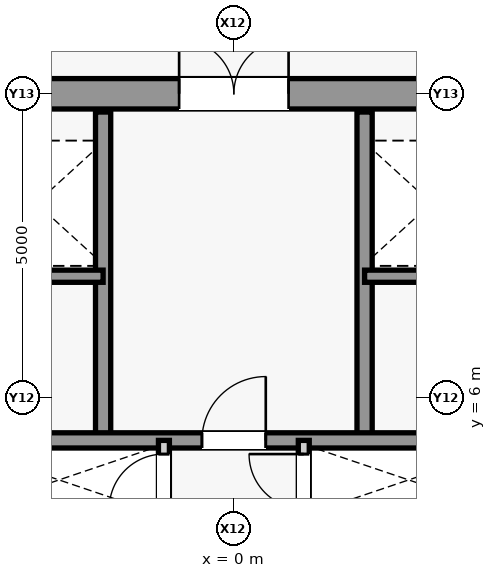
"""IFC4 building model, lengths in metres.
Left out: names, types, materials, properties, quantities, classifications, styles, units other than length and angle.
Written with IfcOpenShell. Run it as: python <this file> out.ifc"""

import sys

from ifc_helpers import new_model, si_unit, direction, frame, frame_2d, origin, place, context, subcontext, project, spatial, rectangle, extrude, source, transform, mapped, element, fill, save


model = new_model("IFC4")
c1 = context("Model", 3, precision=1e-05, world=origin(), true_north=direction((0.0, 1.0)))
c2 = subcontext(c1, "Body", "Model", "MODEL_VIEW")
j1 = project(units=[si_unit("LENGTHUNIT", "METRE"), si_unit("PLANEANGLEUNIT", "RADIAN")], contexts=[c1])
p1 = place(None, origin())
s1 = spatial("IfcSite", under=j1, at=p1, CompositionType="ELEMENT")
p2 = place(p1, origin())
s2 = spatial("IfcBuilding", under=s1, at=p2, CompositionType="ELEMENT")
p3 = place(p2, frame((0.0, 0.0, 116.0)))
s3 = spatial("IfcBuildingStorey", under=s2, at=p3, CompositionType="ELEMENT", Elevation=116.0)
m1 = source(origin(), c2, "Body", "SweptSolid", [
    extrude(rectangle(XDim=9.2, YDim=0.5, at=frame_2d((4.6, 0.0))), origin(), (0.0, 0.0, 1.0), 3.84),
])
p4 = place(p3, frame((-4.6, 11.0, 0.0), z_axis=(0.0, 0.0, 1.0), x_axis=(1.0, 0.0, 0.0)))
e1 = element("IfcWall", 1, at=p4, inside=s3, PredefinedType="SHEAR", context=c2, shape_type="MappedRepresentation", body=[
    mapped(m1, transform((0.0, 0.0, 0.0), scale=1.0)),
])
m2 = source(origin(), c2, "Body", "SweptSolid", [
    extrude(rectangle(XDim=1.8, YDim=2.25, at=frame_2d((0.9, 1.125))), frame((0.0, 0.26, 0.0), z_axis=(0.0, -1.0, 0.0), x_axis=(1.0, 0.0, 0.0)), (0.0, 0.0, 1.0), 0.52),
])
p5 = place(p4, frame((3.7, 0.0, 0.0)))
e2 = element("IfcOpeningElement", 2, at=p5, cuts=e1, PredefinedType="OPENING", context=c2, shape_type="MappedRepresentation", body=[
    mapped(m2, transform((0.0, 0.0, 0.0), scale=1.0)),
])
m3 = source(origin(), c2, "Body", "SweptSolid", [
    extrude(rectangle(XDim=5.4, YDim=0.25, at=frame_2d((2.7, 0.0))), origin(), (0.0, 0.0, 1.0), 3.84),
])
for number, where, z_axis, x_axis in (
    (3, (-2.15, 5.3, 0.0), (0.0, 0.0, 1.0), (0.0, 1.0, 0.0)),
    (4, (2.15, 5.3, 0.0), (0.0, 0.0, 1.0), (0.0, 1.0, 0.0)),
):
    element("IfcWall", number, at=place(p3, frame(where, z_axis=z_axis, x_axis=x_axis)), inside=s3, PredefinedType="SHEAR", context=c2, shape_type="MappedRepresentation", body=[
        mapped(m3, transform((0.0, 0.0, 0.0), scale=1.0)),
    ])
m4 = source(origin(), c2, "Body", "SweptSolid", [
    extrude(rectangle(XDim=2.45, YDim=0.2, at=frame_2d((1.225, 0.0))), origin(), (0.0, 0.0, 1.0), 3.84),
])
for number, where, z_axis, x_axis in (
    (5, (-4.6, 8.0, 0.0), (0.0, 0.0, 1.0), (1.0, 0.0, 0.0)),
    (6, (2.15, 8.0, 0.0), (0.0, 0.0, 1.0), (1.0, 0.0, 0.0)),
):
    element("IfcWall", number, at=place(p3, frame(where, z_axis=z_axis, x_axis=x_axis)), inside=s3, PredefinedType="SHEAR", context=c2, shape_type="MappedRepresentation", body=[
        mapped(m4, transform((0.0, 0.0, 0.0), scale=1.0)),
    ])
m5 = source(origin(), c2, "Body", "SweptSolid", [
    extrude(rectangle(XDim=9.2, YDim=0.25, at=frame_2d((4.6, 0.0))), origin(), (0.0, 0.0, 1.0), 3.84),
])
p6 = place(p3, frame((-4.6, 5.3, 0.0), z_axis=(0.0, 0.0, 1.0), x_axis=(1.0, 0.0, 0.0)))
e7 = element("IfcWall", 7, at=p6, inside=s3, PredefinedType="SHEAR", context=c2, shape_type="MappedRepresentation", body=[
    mapped(m5, transform((0.0, 0.0, 0.0), scale=1.0)),
])
m6 = source(origin(), c2, "Body", "SweptSolid", [
    extrude(rectangle(XDim=1.05, YDim=2.2, at=frame_2d((0.525, 1.1))), frame((0.0, 0.135, 0.0), z_axis=(0.0, -1.0, 0.0), x_axis=(1.0, 0.0, 0.0)), (0.0, 0.0, 1.0), 0.27),
])
p7 = place(p6, frame((4.075, 0.0, 0.0)))
e8 = element("IfcOpeningElement", 8, at=p7, cuts=e7, PredefinedType="OPENING", context=c2, shape_type="MappedRepresentation", body=[
    mapped(m6, transform((0.0, 0.0, 0.0), scale=1.0)),
])
m7 = source(origin(), c2, "Body", "SweptSolid", [
    extrude(rectangle(XDim=10.6, YDim=0.18, at=frame_2d((5.3, 0.0))), origin(), (0.0, 0.0, 1.0), 3.84),
])
p8 = place(p3, frame((-1.15, -5.3, 0.0), z_axis=(0.0, 0.0, 1.0), x_axis=(0.0, 1.0, 0.0)))
e9 = element("IfcWall", 9, at=p8, inside=s3, PredefinedType="PARTITIONING", context=c2, shape_type="MappedRepresentation", body=[
    mapped(m7, transform((0.0, 0.0, 0.0), scale=1.0)),
])
m8 = source(origin(), c2, "Body", "SweptSolid", [
    extrude(rectangle(XDim=0.9, YDim=2.15, at=frame_2d((0.45, 1.075))), frame((0.0, 0.1, 0.0), z_axis=(0.0, -1.0, 0.0), x_axis=(1.0, 0.0, 0.0)), (0.0, 0.0, 1.0), 0.2),
])
p9 = place(p8, frame((1.9, 0.0, 0.0)))
e10 = element("IfcOpeningElement", 10, at=p9, cuts=e9, PredefinedType="OPENING", context=c2, shape_type="MappedRepresentation", body=[
    mapped(m8, transform((0.0, 0.0, 0.0), scale=1.0)),
])
p10 = place(p8, frame((6.55, 0.0, 0.0)))
e11 = element("IfcOpeningElement", 11, at=p10, cuts=e9, PredefinedType="OPENING", context=c2, shape_type="MappedRepresentation", body=[
    mapped(m8, transform((0.0, 0.0, 0.0), scale=1.0)),
])
p11 = place(p8, frame((9.475, 0.0, 0.0)))
e12 = element("IfcOpeningElement", 12, at=p11, cuts=e9, PredefinedType="OPENING", context=c2, shape_type="MappedRepresentation", body=[
    mapped(m8, transform((0.0, 0.0, 0.0), scale=1.0)),
])
p12 = place(p3, frame((1.15, -5.3, 0.0), z_axis=(0.0, 0.0, 1.0), x_axis=(0.0, 1.0, 0.0)))
e13 = element("IfcWall", 13, at=p12, inside=s3, PredefinedType="PARTITIONING", context=c2, shape_type="MappedRepresentation", body=[
    mapped(m7, transform((0.0, 0.0, 0.0), scale=1.0)),
])
p13 = place(p12, frame((0.85, 0.0, 0.0)))
e14 = element("IfcOpeningElement", 14, at=p13, cuts=e13, PredefinedType="OPENING", context=c2, shape_type="MappedRepresentation", body=[
    mapped(m8, transform((0.0, 0.0, 0.0), scale=1.0)),
])
p14 = place(p12, frame((3.55, 0.0, 0.0)))
e15 = element("IfcOpeningElement", 15, at=p14, cuts=e13, PredefinedType="OPENING", context=c2, shape_type="MappedRepresentation", body=[
    mapped(m8, transform((0.0, 0.0, 0.0), scale=1.0)),
])
p15 = place(p12, frame((6.3, 0.0, 0.0)))
e16 = element("IfcOpeningElement", 16, at=p15, cuts=e13, PredefinedType="OPENING", context=c2, shape_type="MappedRepresentation", body=[
    mapped(m8, transform((0.0, 0.0, 0.0), scale=1.0)),
])
p16 = place(p12, frame((8.25, 0.0, 0.0)))
e17 = element("IfcOpeningElement", 17, at=p16, cuts=e13, PredefinedType="OPENING", context=c2, shape_type="MappedRepresentation", body=[
    mapped(m8, transform((0.0, 0.0, 0.0), scale=1.0)),
])
p17 = place(p12, frame((9.475, 0.0, 0.0)))
e18 = element("IfcOpeningElement", 18, at=p17, cuts=e13, PredefinedType="OPENING", context=c2, shape_type="MappedRepresentation", body=[
    mapped(m8, transform((0.0, 0.0, 0.0), scale=1.0)),
])
m9 = source(origin(), c2, "Body", "SweptSolid", [
    extrude(rectangle(XDim=1.05, YDim=2.2, at=frame_2d((0.525, 1.1))), frame((0.0, 0.025, 0.0), z_axis=(0.0, -1.0, 0.0), x_axis=(1.0, 0.0, 0.0)), (0.0, 0.0, 1.0), 0.05),
])
p18 = place(p7, origin())
e19 = element("IfcDoor", 19, at=p18, inside=s3, OperationType="SINGLE_SWING_RIGHT", PredefinedType="DOOR", context=c2, shape_type="MappedRepresentation", body=[
    mapped(m9, transform((0.0, 0.0, 0.0), scale=1.0)),
])
fill(e8, e19)
m10 = source(origin(), c2, "Body", "SweptSolid", [
    extrude(rectangle(XDim=1.8, YDim=2.25, at=frame_2d((0.9, 1.125))), frame((0.0, 0.025, 0.0), z_axis=(0.0, -1.0, 0.0), x_axis=(1.0, 0.0, 0.0)), (0.0, 0.0, 1.0), 0.05),
])
p19 = place(p5, origin())
e20 = element("IfcDoor", 20, at=p19, inside=s3, OperationType="SINGLE_SWING_RIGHT", PredefinedType="DOOR", context=c2, shape_type="MappedRepresentation", body=[
    mapped(m10, transform((0.0, 0.0, 0.0), scale=1.0)),
])
fill(e2, e20)
m11 = source(origin(), c2, "Body", "SweptSolid", [
    extrude(rectangle(XDim=0.9, YDim=2.15, at=frame_2d((0.45, 1.075))), frame((0.0, 0.025, 0.0), z_axis=(0.0, -1.0, 0.0), x_axis=(1.0, 0.0, 0.0)), (0.0, 0.0, 1.0), 0.05),
])
p20 = place(p11, origin())
e21 = element("IfcDoor", 21, at=p20, inside=s3, OperationType="SINGLE_SWING_LEFT", PredefinedType="DOOR", context=c2, shape_type="MappedRepresentation", body=[
    mapped(m11, transform((0.0, 0.0, 0.0), scale=1.0)),
])
fill(e12, e21)
p21 = place(p17, origin())
e22 = element("IfcDoor", 22, at=p21, inside=s3, OperationType="SINGLE_SWING_RIGHT", PredefinedType="DOOR", context=c2, shape_type="MappedRepresentation", body=[
    mapped(m11, transform((0.0, 0.0, 0.0), scale=1.0)),
])
fill(e18, e22)
save(model, sys.argv[1])
